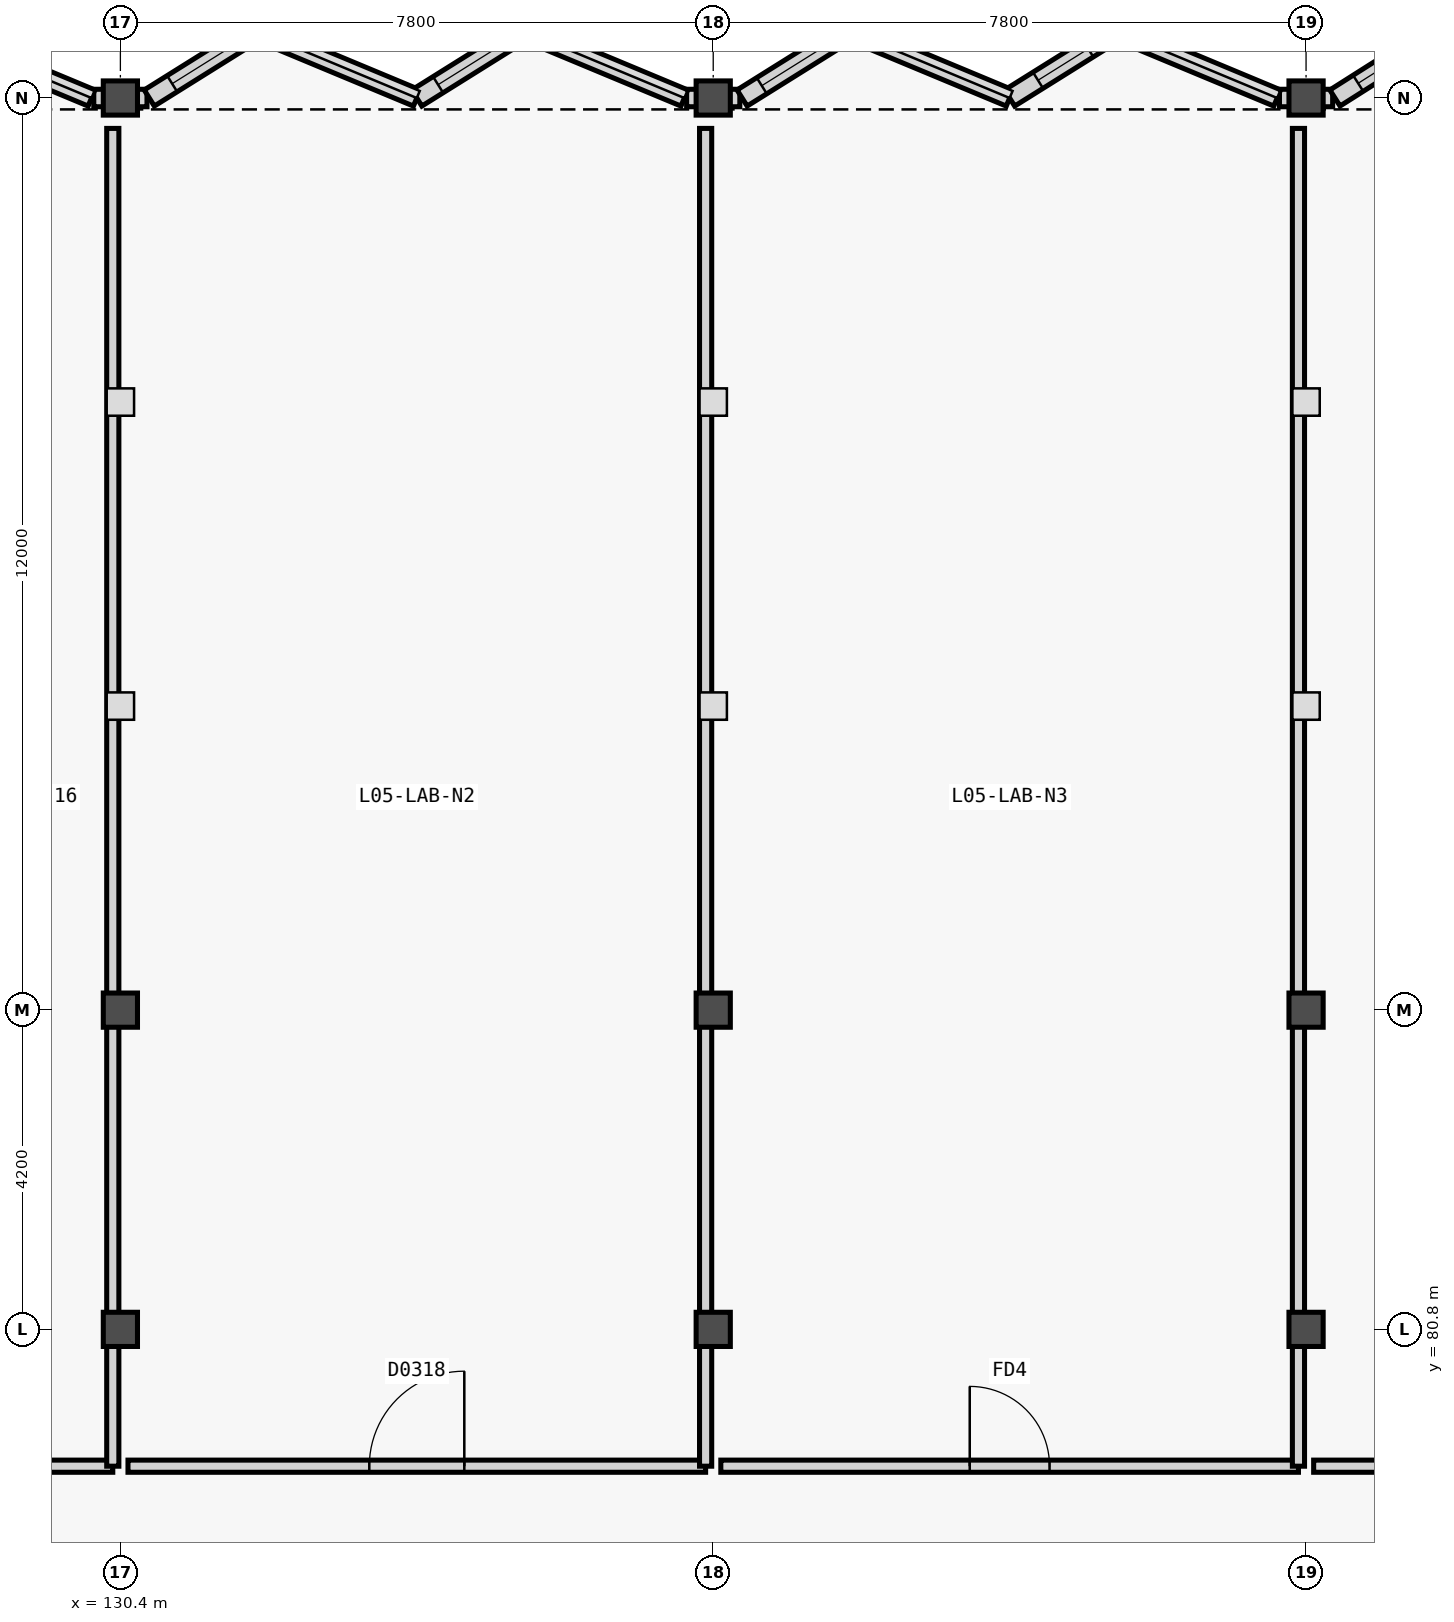
"""IFC4 building model, lengths in metres.
Left out: names, types, materials, properties, quantities, classifications, styles, units other than length and angle.
Written with IfcOpenShell. Run it as: python <this file> out.ifc"""

import sys

from ifc_helpers import new_model, si_unit, direction, frame, frame_2d, origin, origin_2d, place, context, subcontext, project, spatial, rectangle, extrude, element, fill, save


model = new_model("IFC4")
c1 = context("Model", 3, precision=1e-05, world=origin(), true_north=direction((0.0, 1.0)))
c2 = subcontext(c1, "Body", "Model", "MODEL_VIEW")
j1 = project(units=[si_unit("LENGTHUNIT", "METRE"), si_unit("PLANEANGLEUNIT", "RADIAN")], contexts=[c1])
p1 = place(None, origin())
s1 = spatial("IfcSite", under=j1, at=p1, CompositionType="ELEMENT")
p2 = place(p1, origin())
s2 = spatial("IfcBuilding", under=s1, at=p2, CompositionType="ELEMENT")
p3 = place(p2, frame((0.0, 0.0, 21.6)))
s3 = spatial("IfcBuildingStorey", under=s2, at=p3, CompositionType="ELEMENT", Elevation=21.6)
for number, where, z_axis, x_axis in (
    (1, (130.4, 80.8, 0.0), (0.0, 0.0, 1.0), (1.0, 0.0, 0.0)),
    (2, (130.4, 85.0, 0.0), (0.0, 0.0, 1.0), (1.0, 0.0, 0.0)),
):
    element("IfcColumn", number, at=place(p3, frame(where, z_axis=z_axis, x_axis=x_axis)), inside=s3, PredefinedType="COLUMN", context=c2, shape_type="SweptSolid", body=[
        extrude(rectangle(XDim=0.45, YDim=0.45, at=origin_2d()), origin(), (0.0, 0.0, 1.0), 3.6),
    ])
p4 = place(p3, frame((130.4, 97.0, -0.24), z_axis=(0.0, 0.0, 1.0), x_axis=(1.0, 0.0, 0.0)))
e3 = element("IfcColumn", 3, at=p4, inside=s3, PredefinedType="COLUMN", context=c2, shape_type="SweptSolid", body=[
    extrude(rectangle(XDim=0.45, YDim=0.45, at=origin_2d()), origin(), (0.0, 0.0, 1.0), 3.84),
])
for number, where, z_axis, x_axis in (
    (4, (138.2, 80.8, 0.0), (0.0, 0.0, 1.0), (1.0, 0.0, 0.0)),
    (5, (138.2, 85.0, 0.0), (0.0, 0.0, 1.0), (1.0, 0.0, 0.0)),
):
    element("IfcColumn", number, at=place(p3, frame(where, z_axis=z_axis, x_axis=x_axis)), inside=s3, PredefinedType="COLUMN", context=c2, shape_type="SweptSolid", body=[
        extrude(rectangle(XDim=0.45, YDim=0.45, at=origin_2d()), origin(), (0.0, 0.0, 1.0), 3.6),
    ])
p5 = place(p3, frame((138.2, 97.0, -0.24), z_axis=(0.0, 0.0, 1.0), x_axis=(1.0, 0.0, 0.0)))
e6 = element("IfcColumn", 6, at=p5, inside=s3, PredefinedType="COLUMN", context=c2, shape_type="SweptSolid", body=[
    extrude(rectangle(XDim=0.45, YDim=0.45, at=origin_2d()), origin(), (0.0, 0.0, 1.0), 3.84),
])
for number, where, z_axis, x_axis in (
    (7, (146.0, 80.8, 0.0), (0.0, 0.0, 1.0), (1.0, 0.0, 0.0)),
    (8, (146.0, 85.0, 0.0), (0.0, 0.0, 1.0), (1.0, 0.0, 0.0)),
):
    element("IfcColumn", number, at=place(p3, frame(where, z_axis=z_axis, x_axis=x_axis)), inside=s3, PredefinedType="COLUMN", context=c2, shape_type="SweptSolid", body=[
        extrude(rectangle(XDim=0.45, YDim=0.45, at=origin_2d()), origin(), (0.0, 0.0, 1.0), 3.6),
    ])
p6 = place(p3, frame((146.0, 97.0, -0.24), z_axis=(0.0, 0.0, 1.0), x_axis=(1.0, 0.0, 0.0)))
e9 = element("IfcColumn", 9, at=p6, inside=s3, PredefinedType="COLUMN", context=c2, shape_type="SweptSolid", body=[
    extrude(rectangle(XDim=0.45, YDim=0.45, at=origin_2d()), origin(), (0.0, 0.0, 1.0), 3.84),
])
p7 = place(p3, frame((130.05, 97.0, 0.0), z_axis=(0.0, 0.0, 1.0), x_axis=(1.0, 0.0, 0.0)))
e10 = element("IfcWall", 10, at=p7, inside=s3, PredefinedType="SOLIDWALL", context=c2, shape_type="SweptSolid", body=[
    extrude(rectangle(XDim=0.35, YDim=0.23, at=frame_2d((0.175, 0.0))), origin(), (0.0, 0.0, 1.0), 3.36),
])
p8 = place(p3, frame((130.4, 97.0, 0.0), z_axis=(0.0, 0.0, 1.0), x_axis=(1.0, 0.0, 0.0)))
e11 = element("IfcWall", 11, at=p8, inside=s3, PredefinedType="SOLIDWALL", context=c2, shape_type="SweptSolid", body=[
    extrude(rectangle(XDim=0.35, YDim=0.23, at=frame_2d((0.175, 0.0))), origin(), (0.0, 0.0, 1.0), 3.36),
])
p9 = place(p3, frame((137.85, 97.0, 0.0), z_axis=(0.0, 0.0, 1.0), x_axis=(1.0, 0.0, 0.0)))
e12 = element("IfcWall", 12, at=p9, inside=s3, PredefinedType="SOLIDWALL", context=c2, shape_type="SweptSolid", body=[
    extrude(rectangle(XDim=0.35, YDim=0.23, at=frame_2d((0.175, 0.0))), origin(), (0.0, 0.0, 1.0), 3.36),
])
for number, where, z_axis, x_axis in (
    (13, (138.2, 97.0, 0.0), (0.0, 0.0, 1.0), (1.0, 0.0, 0.0)),
    (14, (145.65, 97.0, 0.0), (0.0, 0.0, 1.0), (1.0, 0.0, 0.0)),
    (15, (146.0, 97.0, 0.0), (0.0, 0.0, 1.0), (1.0, 0.0, 0.0)),
):
    element("IfcWall", number, at=place(p3, frame(where, z_axis=z_axis, x_axis=x_axis)), inside=s3, PredefinedType="SOLIDWALL", context=c2, shape_type="SweptSolid", body=[
        extrude(rectangle(XDim=0.35, YDim=0.23, at=frame_2d((0.175, 0.0))), origin(), (0.0, 0.0, 1.0), 3.36),
    ])
p10 = place(p3, frame((127.908, 97.88, 0.0), z_axis=(0.0, 0.0, 1.0), x_axis=(0.92309902008, -0.384562347517, 0.0)))
e16 = element("IfcWall", 16, at=p10, inside=s3, PredefinedType="SOLIDWALL", context=c2, shape_type="SweptSolid", body=[
    extrude(rectangle(XDim=2.288, YDim=0.23, at=frame_2d((1.144, 0.0))), origin(), (0.0, 0.0, 1.0), 3.36),
])
p11 = place(p3, frame((130.78, 97.0, 0.0), z_axis=(0.0, 0.0, 1.0), x_axis=(0.848023086369, 0.529959286158, 0.0)))
e17 = element("IfcWall", 17, at=p11, inside=s3, PredefinedType="SOLIDWALL", context=c2, shape_type="SweptSolid", body=[
    extrude(rectangle(XDim=1.66, YDim=0.25, at=frame_2d((0.83, 0.0))), origin(), (0.0, 0.0, 1.0), 3.36),
])
p12 = place(p11, frame((0.355, 0.0, 0.82)))
e18 = element("IfcOpeningElement", 18, at=p12, cuts=e17, PredefinedType="OPENING", context=c2, shape_type="SweptSolid", body=[
    extrude(rectangle(XDim=0.95, YDim=1.5, at=frame_2d((0.475, 0.75))), frame((0.0, 0.135, 0.0), z_axis=(0.0, -1.0, 0.0), x_axis=(1.0, 0.0, 0.0)), (0.0, 0.0, 1.0), 0.27),
])
p13 = place(p3, frame((132.188, 97.88, 0.0), z_axis=(0.0, 0.0, 1.0), x_axis=(0.92309902008, -0.384562347517, 0.0)))
e19 = element("IfcWall", 19, at=p13, inside=s3, PredefinedType="SOLIDWALL", context=c2, shape_type="SweptSolid", body=[
    extrude(rectangle(XDim=2.288, YDim=0.23, at=frame_2d((1.144, 0.0))), origin(), (0.0, 0.0, 1.0), 3.36),
])
p14 = place(p3, frame((134.3, 97.0, 0.0), z_axis=(0.0, 0.0, 1.0), x_axis=(0.848023086369, 0.529959286158, 0.0)))
e20 = element("IfcWall", 20, at=p14, inside=s3, PredefinedType="SOLIDWALL", context=c2, shape_type="SweptSolid", body=[
    extrude(rectangle(XDim=1.66, YDim=0.25, at=frame_2d((0.83, 0.0))), origin(), (0.0, 0.0, 1.0), 3.36),
])
p15 = place(p14, frame((0.33, 0.0, 0.82)))
e21 = element("IfcOpeningElement", 21, at=p15, cuts=e20, PredefinedType="OPENING", context=c2, shape_type="SweptSolid", body=[
    extrude(rectangle(XDim=1.0, YDim=1.35, at=frame_2d((0.5, 0.675))), frame((0.0, 0.135, 0.0), z_axis=(0.0, -1.0, 0.0), x_axis=(1.0, 0.0, 0.0)), (0.0, 0.0, 1.0), 0.27),
])
p16 = place(p3, frame((135.708, 97.88, 0.0), z_axis=(0.0, 0.0, 1.0), x_axis=(0.92309902008, -0.384562347517, 0.0)))
e22 = element("IfcWall", 22, at=p16, inside=s3, PredefinedType="SOLIDWALL", context=c2, shape_type="SweptSolid", body=[
    extrude(rectangle(XDim=2.288, YDim=0.23, at=frame_2d((1.144, 0.0))), origin(), (0.0, 0.0, 1.0), 3.36),
])
p17 = place(p3, frame((138.58, 97.0, 0.0), z_axis=(0.0, 0.0, 1.0), x_axis=(0.848023086369, 0.529959286158, 0.0)))
e23 = element("IfcWall", 23, at=p17, inside=s3, PredefinedType="SOLIDWALL", context=c2, shape_type="SweptSolid", body=[
    extrude(rectangle(XDim=1.66, YDim=0.25, at=frame_2d((0.83, 0.0))), origin(), (0.0, 0.0, 1.0), 3.36),
])
p18 = place(p17, frame((0.305, 0.0, 0.82)))
e24 = element("IfcOpeningElement", 24, at=p18, cuts=e23, PredefinedType="OPENING", context=c2, shape_type="SweptSolid", body=[
    extrude(rectangle(XDim=1.05, YDim=1.4, at=frame_2d((0.525, 0.7))), frame((0.0, 0.135, 0.0), z_axis=(0.0, -1.0, 0.0), x_axis=(1.0, 0.0, 0.0)), (0.0, 0.0, 1.0), 0.27),
])
p19 = place(p3, frame((139.988, 97.88, 0.0), z_axis=(0.0, 0.0, 1.0), x_axis=(0.92309902008, -0.384562347517, 0.0)))
e25 = element("IfcWall", 25, at=p19, inside=s3, PredefinedType="SOLIDWALL", context=c2, shape_type="SweptSolid", body=[
    extrude(rectangle(XDim=2.288, YDim=0.23, at=frame_2d((1.144, 0.0))), origin(), (0.0, 0.0, 1.0), 3.36),
])
p20 = place(p3, frame((142.1, 97.0, 0.0), z_axis=(0.0, 0.0, 1.0), x_axis=(0.848023086369, 0.529959286158, 0.0)))
e26 = element("IfcWall", 26, at=p20, inside=s3, PredefinedType="SOLIDWALL", context=c2, shape_type="SweptSolid", body=[
    extrude(rectangle(XDim=1.66, YDim=0.25, at=frame_2d((0.83, 0.0))), origin(), (0.0, 0.0, 1.0), 3.36),
])
p21 = place(p20, frame((0.44, 0.0, 0.82)))
e27 = element("IfcOpeningElement", 27, at=p21, cuts=e26, PredefinedType="OPENING", context=c2, shape_type="SweptSolid", body=[
    extrude(rectangle(XDim=0.78, YDim=1.3, at=frame_2d((0.39, 0.65))), frame((0.0, 0.135, 0.0), z_axis=(0.0, -1.0, 0.0), x_axis=(1.0, 0.0, 0.0)), (0.0, 0.0, 1.0), 0.27),
])
p22 = place(p3, frame((143.508, 97.88, 0.0), z_axis=(0.0, 0.0, 1.0), x_axis=(0.92309902008, -0.384562347517, 0.0)))
e28 = element("IfcWall", 28, at=p22, inside=s3, PredefinedType="SOLIDWALL", context=c2, shape_type="SweptSolid", body=[
    extrude(rectangle(XDim=2.288, YDim=0.23, at=frame_2d((1.144, 0.0))), origin(), (0.0, 0.0, 1.0), 3.36),
])
p23 = place(p3, frame((146.38, 97.0, 0.0), z_axis=(0.0, 0.0, 1.0), x_axis=(0.844626536799, 0.535355968805, 0.0)))
e29 = element("IfcWall", 29, at=p23, inside=s3, PredefinedType="SOLIDWALL", context=c2, shape_type="SweptSolid", body=[
    extrude(rectangle(XDim=1.644, YDim=0.25, at=frame_2d((0.822, 0.0))), origin(), (0.0, 0.0, 1.0), 3.36),
])
p24 = place(p23, frame((0.362, 0.0, 0.82)))
e30 = element("IfcOpeningElement", 30, at=p24, cuts=e29, PredefinedType="OPENING", context=c2, shape_type="SweptSolid", body=[
    extrude(rectangle(XDim=0.92, YDim=1.38, at=frame_2d((0.46, 0.69))), frame((0.0, 0.135, 0.0), z_axis=(0.0, -1.0, 0.0), x_axis=(1.0, 0.0, 0.0)), (0.0, 0.0, 1.0), 0.27),
])
p25 = place(p3, frame((122.8, 79.0, 0.0), z_axis=(0.0, 0.0, 1.0), x_axis=(1.0, 0.0, 0.0)))
e31 = element("IfcWall", 31, at=p25, inside=s3, PredefinedType="PARTITIONING", context=c2, shape_type="SweptSolid", body=[
    extrude(rectangle(XDim=7.5, YDim=0.16, at=frame_2d((3.75, 0.0))), origin(), (0.0, 0.0, 1.0), 3.34),
])
p26 = place(p25, frame((3.225, 0.0, 0.0)))
e32 = element("IfcOpeningElement", 32, at=p26, cuts=e31, PredefinedType="OPENING", context=c2, shape_type="SweptSolid", body=[
    extrude(rectangle(XDim=1.05, YDim=2.15, at=frame_2d((0.525, 1.075))), frame((0.0, 0.09, 0.0), z_axis=(0.0, -1.0, 0.0), x_axis=(1.0, 0.0, 0.0)), (0.0, 0.0, 1.0), 0.18),
])
p27 = place(p3, frame((130.3, 79.0, 0.0), z_axis=(0.0, 0.0, 1.0), x_axis=(0.0, 1.0, 0.0)))
e33 = element("IfcWall", 33, at=p27, inside=s3, PredefinedType="PARTITIONING", context=c2, shape_type="SweptSolid", body=[
    extrude(rectangle(XDim=17.6, YDim=0.16, at=frame_2d((8.8, 0.0))), origin(), (0.0, 0.0, 1.0), 1.98),
])
p28 = place(p3, frame((130.5, 79.0, 0.0), z_axis=(0.0, 0.0, 1.0), x_axis=(1.0, 0.0, 0.0)))
e34 = element("IfcWall", 34, at=p28, inside=s3, PredefinedType="PARTITIONING", context=c2, shape_type="SweptSolid", body=[
    extrude(rectangle(XDim=7.6, YDim=0.16, at=frame_2d((3.8, 0.0))), origin(), (0.0, 0.0, 1.0), 3.34),
])
p29 = place(p28, frame((3.175, 0.0, 0.0)))
e35 = element("IfcOpeningElement", 35, at=p29, cuts=e34, PredefinedType="OPENING", context=c2, shape_type="SweptSolid", body=[
    extrude(rectangle(XDim=1.25, YDim=2.2, at=frame_2d((0.625, 1.1))), frame((0.0, 0.09, 0.0), z_axis=(0.0, -1.0, 0.0), x_axis=(1.0, 0.0, 0.0)), (0.0, 0.0, 1.0), 0.18),
])
p30 = place(p3, frame((138.1, 79.0, 0.0), z_axis=(0.0, 0.0, 1.0), x_axis=(0.0, 1.0, 0.0)))
e36 = element("IfcWall", 36, at=p30, inside=s3, PredefinedType="PARTITIONING", context=c2, shape_type="SweptSolid", body=[
    extrude(rectangle(XDim=17.6, YDim=0.16, at=frame_2d((8.8, 0.0))), origin(), (0.0, 0.0, 1.0), 1.98),
])
p31 = place(p3, frame((138.3, 79.0, 0.0), z_axis=(0.0, 0.0, 1.0), x_axis=(1.0, 0.0, 0.0)))
e37 = element("IfcWall", 37, at=p31, inside=s3, PredefinedType="PARTITIONING", context=c2, shape_type="SweptSolid", body=[
    extrude(rectangle(XDim=7.6, YDim=0.16, at=frame_2d((3.8, 0.0))), origin(), (0.0, 0.0, 1.0), 3.34),
])
p32 = place(p31, frame((3.275, 0.0, 0.0)))
e38 = element("IfcOpeningElement", 38, at=p32, cuts=e37, PredefinedType="OPENING", context=c2, shape_type="SweptSolid", body=[
    extrude(rectangle(XDim=1.05, YDim=2.15, at=frame_2d((0.525, 1.075))), frame((0.0, 0.09, 0.0), z_axis=(0.0, -1.0, 0.0), x_axis=(1.0, 0.0, 0.0)), (0.0, 0.0, 1.0), 0.18),
])
p33 = place(p3, frame((145.9, 79.0, 0.0), z_axis=(0.0, 0.0, 1.0), x_axis=(0.0, 1.0, 0.0)))
e39 = element("IfcWall", 39, at=p33, inside=s3, PredefinedType="PARTITIONING", context=c2, shape_type="SweptSolid", body=[
    extrude(rectangle(XDim=17.6, YDim=0.16, at=frame_2d((8.8, 0.0))), origin(), (0.0, 0.0, 1.0), 1.98),
])
p34 = place(p3, frame((146.1, 79.0, 0.0), z_axis=(0.0, 0.0, 1.0), x_axis=(1.0, 0.0, 0.0)))
e40 = element("IfcWall", 40, at=p34, inside=s3, PredefinedType="PARTITIONING", context=c2, shape_type="SweptSolid", body=[
    extrude(rectangle(XDim=7.5, YDim=0.16, at=frame_2d((3.75, 0.0))), origin(), (0.0, 0.0, 1.0), 3.34),
])
p35 = place(p34, frame((3.225, 0.0, 0.0)))
e41 = element("IfcOpeningElement", 41, at=p35, cuts=e40, PredefinedType="OPENING", context=c2, shape_type="SweptSolid", body=[
    extrude(rectangle(XDim=1.05, YDim=2.15, at=frame_2d((0.525, 1.075))), frame((0.0, 0.09, 0.0), z_axis=(0.0, -1.0, 0.0), x_axis=(1.0, 0.0, 0.0)), (0.0, 0.0, 1.0), 0.18),
])
p36 = place(p12, origin())
e42 = element("IfcWindow", 42, at=p36, inside=s3, PartitioningType="SINGLE_PANEL", PredefinedType="WINDOW", context=c2, shape_type="SweptSolid", body=[
    extrude(rectangle(XDim=0.95, YDim=1.5, at=frame_2d((0.475, 0.75))), frame((0.0, 0.03, 0.0), z_axis=(0.0, -1.0, 0.0), x_axis=(1.0, 0.0, 0.0)), (0.0, 0.0, 1.0), 0.06),
])
fill(e18, e42)
p37 = place(p15, origin())
e43 = element("IfcWindow", 43, at=p37, inside=s3, PartitioningType="SINGLE_PANEL", PredefinedType="WINDOW", context=c2, shape_type="SweptSolid", body=[
    extrude(rectangle(XDim=1.0, YDim=1.35, at=frame_2d((0.5, 0.675))), frame((0.0, 0.03, 0.0), z_axis=(0.0, -1.0, 0.0), x_axis=(1.0, 0.0, 0.0)), (0.0, 0.0, 1.0), 0.06),
])
fill(e21, e43)
p38 = place(p18, origin())
e44 = element("IfcWindow", 44, at=p38, inside=s3, PartitioningType="SINGLE_PANEL", PredefinedType="WINDOW", context=c2, shape_type="SweptSolid", body=[
    extrude(rectangle(XDim=1.05, YDim=1.4, at=frame_2d((0.525, 0.7))), frame((0.0, 0.03, 0.0), z_axis=(0.0, -1.0, 0.0), x_axis=(1.0, 0.0, 0.0)), (0.0, 0.0, 1.0), 0.06),
])
fill(e24, e44)
p39 = place(p21, origin())
e45 = element("IfcWindow", 45, at=p39, inside=s3, PartitioningType="SINGLE_PANEL", PredefinedType="WINDOW", context=c2, shape_type="SweptSolid", body=[
    extrude(rectangle(XDim=0.78, YDim=1.3, at=frame_2d((0.39, 0.65))), frame((0.0, 0.03, 0.0), z_axis=(0.0, -1.0, 0.0), x_axis=(1.0, 0.0, 0.0)), (0.0, 0.0, 1.0), 0.06),
])
fill(e27, e45)
p40 = place(p24, origin())
e46 = element("IfcWindow", 46, at=p40, inside=s3, PartitioningType="SINGLE_PANEL", PredefinedType="WINDOW", context=c2, shape_type="SweptSolid", body=[
    extrude(rectangle(XDim=0.92, YDim=1.38, at=frame_2d((0.46, 0.69))), frame((0.0, 0.03, 0.0), z_axis=(0.0, -1.0, 0.0), x_axis=(1.0, 0.0, 0.0)), (0.0, 0.0, 1.0), 0.06),
])
fill(e30, e46)
p41 = place(p29, origin())
e47 = element("IfcDoor", 47, at=p41, inside=s3, OperationType="SINGLE_SWING_RIGHT", PredefinedType="DOOR", context=c2, shape_type="SweptSolid", body=[
    extrude(rectangle(XDim=1.25, YDim=2.2, at=frame_2d((0.625, 1.1))), frame((0.0, 0.025, 0.0), z_axis=(0.0, -1.0, 0.0), x_axis=(1.0, 0.0, 0.0)), (0.0, 0.0, 1.0), 0.05),
])
fill(e35, e47)
p42 = place(p32, origin())
e48 = element("IfcDoor", 48, at=p42, inside=s3, OperationType="SINGLE_SWING_LEFT", PredefinedType="DOOR", context=c2, shape_type="SweptSolid", body=[
    extrude(rectangle(XDim=1.05, YDim=2.15, at=frame_2d((0.525, 1.075))), frame((0.0, 0.025, 0.0), z_axis=(0.0, -1.0, 0.0), x_axis=(1.0, 0.0, 0.0)), (0.0, 0.0, 1.0), 0.05),
])
fill(e38, e48)
save(model, sys.argv[1])
